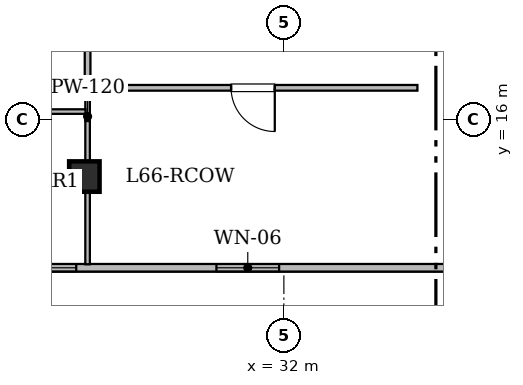
"""IFC4 building model, lengths in metres.
Left out: names, types, materials, properties, quantities, classifications, styles, units other than length and angle.
Written with IfcOpenShell. Run it as: python <this file> out.ifc"""

import sys

from ifc_helpers import new_model, si_unit, direction, frame, frame_2d, origin, origin_2d, place, context, subcontext, project, spatial, rectangle, hollow_rectangle, extrude, element, fill, save


model = new_model("IFC4")
c1 = context("Model", 3, precision=1e-05, world=origin(), true_north=direction((0.0, 1.0)))
c2 = subcontext(c1, "Body", "Model", "MODEL_VIEW")
j1 = project(units=[si_unit("LENGTHUNIT", "METRE"), si_unit("PLANEANGLEUNIT", "RADIAN")], contexts=[c1])
p1 = place(None, origin())
s1 = spatial("IfcSite", under=j1, at=p1, CompositionType="ELEMENT")
p2 = place(p1, origin())
s2 = spatial("IfcBuilding", under=s1, at=p2, CompositionType="ELEMENT")
p3 = place(p2, frame((0.0, 0.0, 257.35)))
s3 = spatial("IfcBuildingStorey", under=s2, at=p3, CompositionType="ELEMENT", Elevation=257.35)
p4 = place(p3, frame((26.75, 14.5, 0.0), z_axis=(0.0, 0.0, 1.0), x_axis=(1.0, 0.0, 0.0)))
e1 = element("IfcColumn", 1, at=p4, inside=s3, PredefinedType="COLUMN", context=c2, shape_type="SweptSolid", body=[
    extrude(hollow_rectangle(XDim=0.8, YDim=0.8, WallThickness=0.04, at=origin_2d()), origin(), (0.0, 0.0, 1.0), 3.65),
])
p5 = place(p3, frame((65.696, 12.1, 0.0), z_axis=(0.0, 0.0, 1.0), x_axis=(-1.0, 0.0, 0.0)))
e2 = element("IfcWall", 2, at=p5, inside=s3, PredefinedType="STANDARD", context=c2, shape_type="SweptSolid", body=[
    extrude(rectangle(XDim=41.393, YDim=0.2, at=frame_2d((20.697, 0.0))), origin(), (0.0, 0.0, 1.0), 3.43),
])
p6 = place(p5, frame((33.821, 0.0, 0.85)))
e3 = element("IfcOpeningElement", 3, at=p6, cuts=e2, PredefinedType="OPENING", context=c2, shape_type="SweptSolid", body=[
    extrude(rectangle(XDim=1.65, YDim=1.55, at=frame_2d((0.825, 0.775))), frame((0.0, 0.11, 0.0), z_axis=(0.0, -1.0, 0.0), x_axis=(1.0, 0.0, 0.0)), (0.0, 0.0, 1.0), 0.22),
])
p7 = place(p5, frame((39.16, 0.0, 0.85)))
e4 = element("IfcOpeningElement", 4, at=p7, cuts=e2, PredefinedType="OPENING", context=c2, shape_type="SweptSolid", body=[
    extrude(rectangle(XDim=1.65, YDim=1.55, at=frame_2d((0.825, 0.775))), frame((0.0, 0.11, 0.0), z_axis=(0.0, -1.0, 0.0), x_axis=(1.0, 0.0, 0.0)), (0.0, 0.0, 1.0), 0.22),
])
p8 = place(p5, frame((17.006, 0.0, 0.8)))
e5 = element("IfcOpeningElement", 5, at=p8, cuts=e2, PredefinedType="OPENING", context=c2, shape_type="SweptSolid", body=[
    extrude(rectangle(XDim=1.2, YDim=1.5, at=frame_2d((0.6, 0.75))), frame((0.0, 0.11, 0.0), z_axis=(0.0, -1.0, 0.0), x_axis=(1.0, 0.0, 0.0)), (0.0, 0.0, 1.0), 0.22),
])
p9 = place(p5, frame((20.411, 0.0, 0.85)))
e6 = element("IfcOpeningElement", 6, at=p9, cuts=e2, PredefinedType="OPENING", context=c2, shape_type="SweptSolid", body=[
    extrude(rectangle(XDim=1.65, YDim=1.55, at=frame_2d((0.825, 0.775))), frame((0.0, 0.11, 0.0), z_axis=(0.0, -1.0, 0.0), x_axis=(1.0, 0.0, 0.0)), (0.0, 0.0, 1.0), 0.22),
])
p10 = place(p5, frame((13.151, 0.0, 0.85)))
e7 = element("IfcOpeningElement", 7, at=p10, cuts=e2, PredefinedType="OPENING", context=c2, shape_type="SweptSolid", body=[
    extrude(rectangle(XDim=1.65, YDim=1.55, at=frame_2d((0.825, 0.775))), frame((0.0, 0.11, 0.0), z_axis=(0.0, -1.0, 0.0), x_axis=(1.0, 0.0, 0.0)), (0.0, 0.0, 1.0), 0.22),
])
p11 = place(p5, frame((2.936, 0.0, 0.8)))
e8 = element("IfcOpeningElement", 8, at=p11, cuts=e2, PredefinedType="OPENING", context=c2, shape_type="SweptSolid", body=[
    extrude(rectangle(XDim=1.2, YDim=1.5, at=frame_2d((0.6, 0.75))), frame((0.0, 0.11, 0.0), z_axis=(0.0, -1.0, 0.0), x_axis=(1.0, 0.0, 0.0)), (0.0, 0.0, 1.0), 0.22),
])
p12 = place(p5, frame((6.901, 0.0, 0.85)))
e9 = element("IfcOpeningElement", 9, at=p12, cuts=e2, PredefinedType="OPENING", context=c2, shape_type="SweptSolid", body=[
    extrude(rectangle(XDim=1.65, YDim=1.55, at=frame_2d((0.825, 0.775))), frame((0.0, 0.11, 0.0), z_axis=(0.0, -1.0, 0.0), x_axis=(1.0, 0.0, 0.0)), (0.0, 0.0, 1.0), 0.22),
])
p13 = place(p5, frame((0.693, 0.0, 0.85)))
e10 = element("IfcOpeningElement", 10, at=p13, cuts=e2, PredefinedType="OPENING", context=c2, shape_type="SweptSolid", body=[
    extrude(rectangle(XDim=1.65, YDim=1.55, at=frame_2d((0.825, 0.775))), frame((0.0, 0.11, 0.0), z_axis=(0.0, -1.0, 0.0), x_axis=(1.0, 0.0, 0.0)), (0.0, 0.0, 1.0), 0.22),
])
p14 = place(p3, frame((35.514, 16.835, 0.0), z_axis=(0.0, 0.0, 1.0), x_axis=(-1.0, 0.0, 0.0)))
e11 = element("IfcWall", 11, at=p14, inside=s3, PredefinedType="STANDARD", context=c2, shape_type="SweptSolid", body=[
    extrude(rectangle(XDim=8.614, YDim=0.15, at=frame_2d((4.307, 0.0))), origin(), (0.0, 0.0, 1.0), 2.725),
])
p15 = place(p14, frame((3.753, 0.0, 0.0)))
e12 = element("IfcOpeningElement", 12, at=p15, cuts=e11, PredefinedType="OPENING", context=c2, shape_type="SweptSolid", body=[
    extrude(rectangle(XDim=1.15, YDim=2.2, at=frame_2d((0.575, 1.1))), frame((0.0, 0.085, 0.0), z_axis=(0.0, -1.0, 0.0), x_axis=(1.0, 0.0, 0.0)), (0.0, 0.0, 1.0), 0.17),
])
p16 = place(p3, frame((26.835, 16.9, 0.0), z_axis=(0.0, 0.0, 1.0), x_axis=(0.0, 1.0, 0.0)))
e13 = element("IfcWall", 13, at=p16, inside=s3, PredefinedType="STANDARD", context=c2, shape_type="SweptSolid", body=[
    extrude(rectangle(XDim=8.033, YDim=0.15, at=frame_2d((4.017, 0.0))), origin(), (0.0, 0.0, 1.0), 2.725),
])
p17 = place(p16, frame((3.495, 0.0, 0.0)))
e14 = element("IfcOpeningElement", 14, at=p17, cuts=e13, PredefinedType="OPENING", context=c2, shape_type="SweptSolid", body=[
    extrude(rectangle(XDim=1.0, YDim=2.15, at=frame_2d((0.5, 1.075))), frame((0.0, 0.085, 0.0), z_axis=(0.0, -1.0, 0.0), x_axis=(1.0, 0.0, 0.0)), (0.0, 0.0, 1.0), 0.17),
])
p18 = place(p3, frame((26.835, 15.961, 0.0), z_axis=(0.0, 0.0, 1.0), x_axis=(0.0, 1.0, 0.0)))
e15 = element("IfcWall", 15, at=p18, inside=s3, PredefinedType="PARTITIONING", context=c2, shape_type="SweptSolid", body=[
    extrude(rectangle(XDim=0.809, YDim=0.12, at=frame_2d((0.405, 0.0))), origin(), (0.0, 0.0, 1.0), 3.43),
])
p19 = place(p3, frame((26.835, 12.192, 0.0), z_axis=(0.0, 0.0, 1.0), x_axis=(0.0, 1.0, 0.0)))
e16 = element("IfcWall", 16, at=p19, inside=s3, PredefinedType="PARTITIONING", context=c2, shape_type="SweptSolid", body=[
    extrude(rectangle(XDim=3.769, YDim=0.12, at=frame_2d((1.885, 0.0))), origin(), (0.0, 0.0, 1.0), 2.725),
])
p20 = place(p3, frame((26.781, 16.21, 0.0), z_axis=(0.0, 0.0, 1.0), x_axis=(-1.0, 0.0, 0.0)))
e17 = element("IfcWall", 17, at=p20, inside=s3, PredefinedType="PARTITIONING", context=c2, shape_type="SweptSolid", body=[
    extrude(rectangle(XDim=6.389, YDim=0.12, at=frame_2d((3.194, 0.0))), origin(), (0.0, 0.0, 1.0), 2.887),
])
p21 = place(p20, frame((2.744, 0.0, 0.0)))
e18 = element("IfcOpeningElement", 18, at=p21, cuts=e17, PredefinedType="OPENING", context=c2, shape_type="SweptSolid", body=[
    extrude(rectangle(XDim=0.9, YDim=2.1, at=frame_2d((0.45, 1.05))), frame((0.0, 0.07, 0.0), z_axis=(0.0, -1.0, 0.0), x_axis=(1.0, 0.0, 0.0)), (0.0, 0.0, 1.0), 0.14),
])
p22 = place(p6, origin())
e19 = element("IfcWindow", 19, at=p22, inside=s3, PartitioningType="SINGLE_PANEL", PredefinedType="WINDOW", context=c2, shape_type="SweptSolid", body=[
    extrude(rectangle(XDim=1.65, YDim=1.55, at=frame_2d((0.825, 0.775))), frame((0.0, 0.03, 0.0), z_axis=(0.0, -1.0, 0.0), x_axis=(1.0, 0.0, 0.0)), (0.0, 0.0, 1.0), 0.06),
])
fill(e3, e19)
p23 = place(p7, origin())
e20 = element("IfcWindow", 20, at=p23, inside=s3, PartitioningType="SINGLE_PANEL", PredefinedType="WINDOW", context=c2, shape_type="SweptSolid", body=[
    extrude(rectangle(XDim=1.65, YDim=1.55, at=frame_2d((0.825, 0.775))), frame((0.0, 0.03, 0.0), z_axis=(0.0, -1.0, 0.0), x_axis=(1.0, 0.0, 0.0)), (0.0, 0.0, 1.0), 0.06),
])
fill(e4, e20)
p24 = place(p15, origin())
e21 = element("IfcDoor", 21, at=p24, inside=s3, OperationType="SINGLE_SWING_LEFT", PredefinedType="DOOR", context=c2, shape_type="SweptSolid", body=[
    extrude(rectangle(XDim=1.15, YDim=2.2, at=frame_2d((0.575, 1.1))), frame((0.0, 0.025, 0.0), z_axis=(0.0, -1.0, 0.0), x_axis=(1.0, 0.0, 0.0)), (0.0, 0.0, 1.0), 0.05),
])
fill(e12, e21)
save(model, sys.argv[1])
